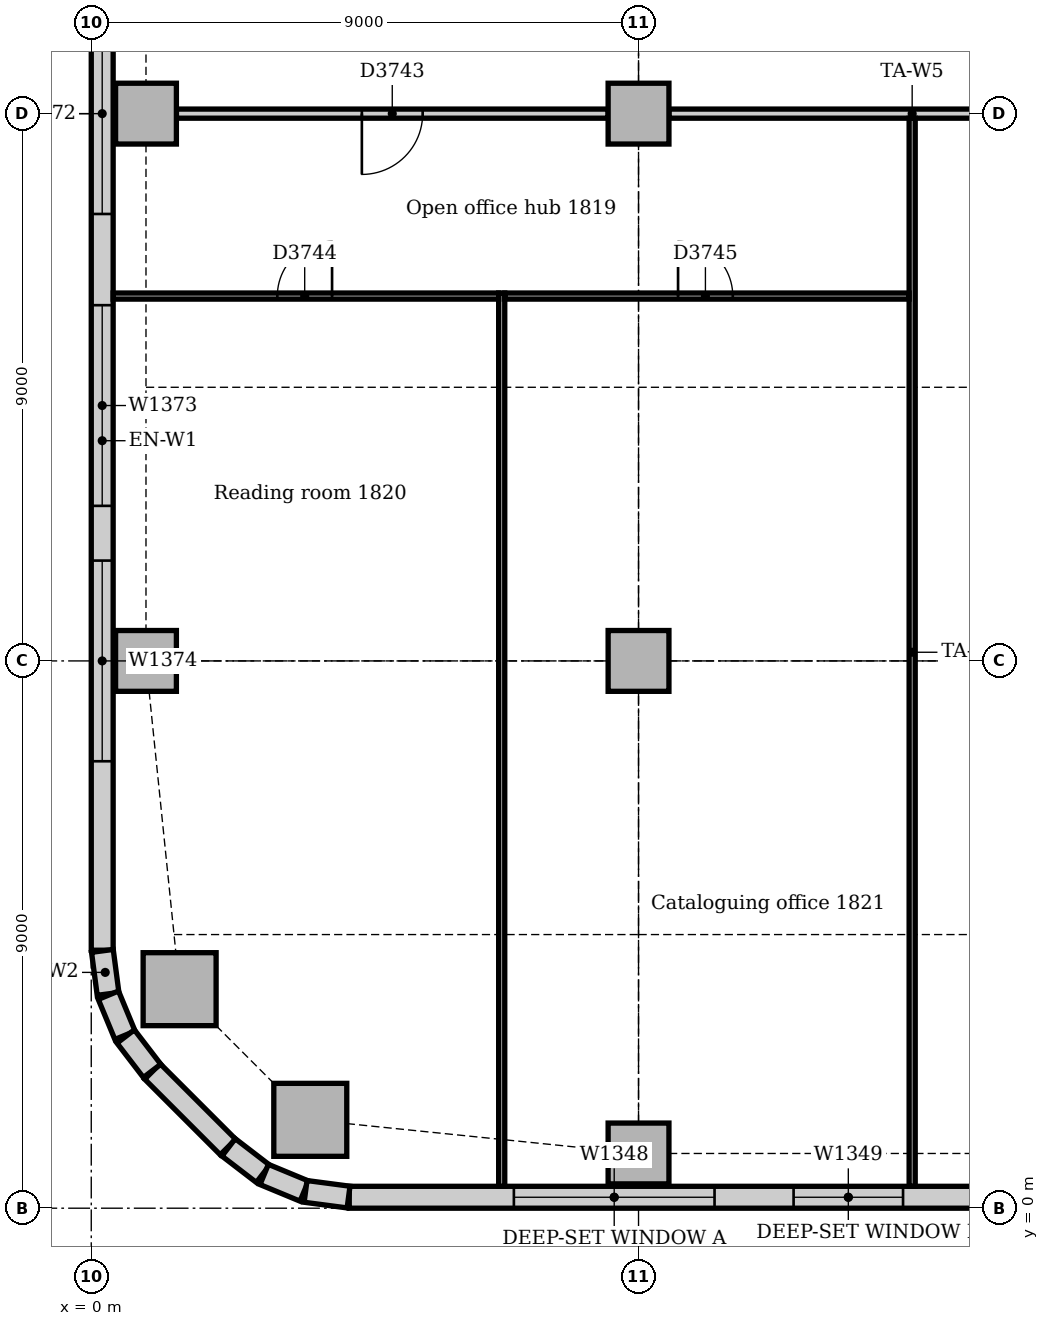
"""IFC4 building model, lengths in metres.
Left out: names, types, materials, properties, quantities, classifications, styles, units other than length and angle.
Written with IfcOpenShell. Run it as: python <this file> out.ifc"""

import sys

from ifc_helpers import new_model, si_unit, direction, frame, frame_2d, origin, origin_2d, place, context, subcontext, project, spatial, rectangle, extrude, element, fill, save


model = new_model("IFC4")
c1 = context("Model", 3, precision=1e-05, world=origin(), true_north=direction((0.0, 1.0)))
c2 = subcontext(c1, "Body", "Model", "MODEL_VIEW")
j1 = project(units=[si_unit("LENGTHUNIT", "METRE"), si_unit("PLANEANGLEUNIT", "RADIAN")], contexts=[c1])
p1 = place(None, origin())
s1 = spatial("IfcSite", under=j1, at=p1, CompositionType="ELEMENT")
p2 = place(p1, origin())
s2 = spatial("IfcBuilding", under=s1, at=p2, CompositionType="ELEMENT")
p3 = place(p2, frame((0.0, 0.0, 79.0)))
s3 = spatial("IfcBuildingStorey", under=s2, at=p3, CompositionType="ELEMENT", Elevation=79.0)
for number, where, z_axis, x_axis in (
    (1, (3.602, 1.453, 0.0), (0.0, 0.0, 1.0), (1.0, 0.0, 0.0)),
    (2, (1.453, 3.602, 0.0), (0.0, 0.0, 1.0), (1.0, 0.0, 0.0)),
):
    element("IfcColumn", number, at=place(p3, frame(where, z_axis=z_axis, x_axis=x_axis)), inside=s3, PredefinedType="COLUMN", context=c2, shape_type="SweptSolid", body=[
        extrude(rectangle(XDim=1.2, YDim=1.2, at=origin_2d()), origin(), (0.0, 0.0, 1.0), 3.85),
    ])
for number, where, z_axis, x_axis in (
    (3, (9.0, 0.9, 0.0), (0.0, 0.0, 1.0), (1.0, 0.0, 0.0)),
    (4, (0.9, 9.0, 0.0), (0.0, 0.0, 1.0), (1.0, 0.0, 0.0)),
    (5, (0.9, 18.0, 0.0), (0.0, 0.0, 1.0), (1.0, 0.0, 0.0)),
    (6, (9.0, 9.0, 0.0), (0.0, 0.0, 1.0), (1.0, 0.0, 0.0)),
    (7, (9.0, 18.0, 0.0), (0.0, 0.0, 1.0), (1.0, 0.0, 0.0)),
):
    element("IfcColumn", number, at=place(p3, frame(where, z_axis=z_axis, x_axis=x_axis)), inside=s3, PredefinedType="COLUMN", context=c2, shape_type="SweptSolid", body=[
        extrude(rectangle(XDim=1.0, YDim=1.0, at=origin_2d()), origin(), (0.0, 0.0, 1.0), 3.85),
    ])
p4 = place(p3, frame((4.243, 0.18, 0.0), z_axis=(0.0, 0.0, 1.0), x_axis=(1.0, 0.0, 0.0)))
e8 = element("IfcWall", 8, at=p4, inside=s3, PredefinedType="STANDARD", context=c2, shape_type="SweptSolid", body=[
    extrude(rectangle(XDim=44.015, YDim=0.36, at=frame_2d((22.007, 0.0))), origin(), (0.0, 0.0, 1.0), 3.85),
])
p5 = place(p4, frame((2.707, 0.0, 0.9)))
e9 = element("IfcOpeningElement", 9, at=p5, cuts=e8, PredefinedType="OPENING", context=c2, shape_type="SweptSolid", body=[
    extrude(rectangle(XDim=3.3, YDim=1.6, at=frame_2d((1.65, 0.8))), frame((0.0, 0.19, 0.0), z_axis=(0.0, -1.0, 0.0), x_axis=(1.0, 0.0, 0.0)), (0.0, 0.0, 1.0), 0.38),
])
p6 = place(p4, frame((7.307, 0.0, 0.9)))
e10 = element("IfcOpeningElement", 10, at=p6, cuts=e8, PredefinedType="OPENING", context=c2, shape_type="SweptSolid", body=[
    extrude(rectangle(XDim=1.8, YDim=1.6, at=frame_2d((0.9, 0.8))), frame((0.0, 0.19, 0.0), z_axis=(0.0, -1.0, 0.0), x_axis=(1.0, 0.0, 0.0)), (0.0, 0.0, 1.0), 0.38),
])
p7 = place(p4, frame((11.357, 0.0, 0.9)))
e11 = element("IfcOpeningElement", 11, at=p7, cuts=e8, PredefinedType="OPENING", context=c2, shape_type="SweptSolid", body=[
    extrude(rectangle(XDim=3.3, YDim=1.6, at=frame_2d((1.65, 0.8))), frame((0.0, 0.19, 0.0), z_axis=(0.0, -1.0, 0.0), x_axis=(1.0, 0.0, 0.0)), (0.0, 0.0, 1.0), 0.38),
])
p8 = place(p4, frame((15.857, 0.0, 0.9)))
e12 = element("IfcOpeningElement", 12, at=p8, cuts=e8, PredefinedType="OPENING", context=c2, shape_type="SweptSolid", body=[
    extrude(rectangle(XDim=3.3, YDim=1.6, at=frame_2d((1.65, 0.8))), frame((0.0, 0.19, 0.0), z_axis=(0.0, -1.0, 0.0), x_axis=(1.0, 0.0, 0.0)), (0.0, 0.0, 1.0), 0.38),
])
p9 = place(p4, frame((20.357, 0.0, 0.9)))
e13 = element("IfcOpeningElement", 13, at=p9, cuts=e8, PredefinedType="OPENING", context=c2, shape_type="SweptSolid", body=[
    extrude(rectangle(XDim=3.3, YDim=1.6, at=frame_2d((1.65, 0.8))), frame((0.0, 0.19, 0.0), z_axis=(0.0, -1.0, 0.0), x_axis=(1.0, 0.0, 0.0)), (0.0, 0.0, 1.0), 0.38),
])
p10 = place(p4, frame((24.857, 0.0, 0.9)))
e14 = element("IfcOpeningElement", 14, at=p10, cuts=e8, PredefinedType="OPENING", context=c2, shape_type="SweptSolid", body=[
    extrude(rectangle(XDim=3.3, YDim=1.6, at=frame_2d((1.65, 0.8))), frame((0.0, 0.19, 0.0), z_axis=(0.0, -1.0, 0.0), x_axis=(1.0, 0.0, 0.0)), (0.0, 0.0, 1.0), 0.38),
])
p11 = place(p4, frame((29.357, 0.0, 0.9)))
e15 = element("IfcOpeningElement", 15, at=p11, cuts=e8, PredefinedType="OPENING", context=c2, shape_type="SweptSolid", body=[
    extrude(rectangle(XDim=3.3, YDim=1.6, at=frame_2d((1.65, 0.8))), frame((0.0, 0.19, 0.0), z_axis=(0.0, -1.0, 0.0), x_axis=(1.0, 0.0, 0.0)), (0.0, 0.0, 1.0), 0.38),
])
p12 = place(p4, frame((33.857, 0.0, 0.9)))
e16 = element("IfcOpeningElement", 16, at=p12, cuts=e8, PredefinedType="OPENING", context=c2, shape_type="SweptSolid", body=[
    extrude(rectangle(XDim=3.3, YDim=1.6, at=frame_2d((1.65, 0.8))), frame((0.0, 0.19, 0.0), z_axis=(0.0, -1.0, 0.0), x_axis=(1.0, 0.0, 0.0)), (0.0, 0.0, 1.0), 0.38),
])
p13 = place(p4, frame((38.357, 0.0, 0.9)))
e17 = element("IfcOpeningElement", 17, at=p13, cuts=e8, PredefinedType="OPENING", context=c2, shape_type="SweptSolid", body=[
    extrude(rectangle(XDim=3.3, YDim=1.6, at=frame_2d((1.65, 0.8))), frame((0.0, 0.19, 0.0), z_axis=(0.0, -1.0, 0.0), x_axis=(1.0, 0.0, 0.0)), (0.0, 0.0, 1.0), 0.38),
])
p14 = place(p3, frame((0.18, 21.0, 0.0), z_axis=(0.0, 0.0, 1.0), x_axis=(0.0, -1.0, 0.0)))
e18 = element("IfcWall", 18, at=p14, inside=s3, PredefinedType="STANDARD", context=c2, shape_type="SweptSolid", body=[
    extrude(rectangle(XDim=16.757, YDim=0.36, at=frame_2d((8.379, 0.0))), origin(), (0.0, 0.0, 1.0), 3.85),
])
p15 = place(p14, frame((1.35, 0.0, 0.9)))
e19 = element("IfcOpeningElement", 19, at=p15, cuts=e18, PredefinedType="OPENING", context=c2, shape_type="SweptSolid", body=[
    extrude(rectangle(XDim=3.3, YDim=1.6, at=frame_2d((1.65, 0.8))), frame((0.0, 0.19, 0.0), z_axis=(0.0, -1.0, 0.0), x_axis=(1.0, 0.0, 0.0)), (0.0, 0.0, 1.0), 0.38),
])
p16 = place(p14, frame((6.15, 0.0, 0.9)))
e20 = element("IfcOpeningElement", 20, at=p16, cuts=e18, PredefinedType="OPENING", context=c2, shape_type="SweptSolid", body=[
    extrude(rectangle(XDim=3.3, YDim=1.6, at=frame_2d((1.65, 0.8))), frame((0.0, 0.19, 0.0), z_axis=(0.0, -1.0, 0.0), x_axis=(1.0, 0.0, 0.0)), (0.0, 0.0, 1.0), 0.38),
])
p17 = place(p14, frame((10.35, 0.0, 0.9)))
e21 = element("IfcOpeningElement", 21, at=p17, cuts=e18, PredefinedType="OPENING", context=c2, shape_type="SweptSolid", body=[
    extrude(rectangle(XDim=3.3, YDim=1.6, at=frame_2d((1.65, 0.8))), frame((0.0, 0.19, 0.0), z_axis=(0.0, -1.0, 0.0), x_axis=(1.0, 0.0, 0.0)), (0.0, 0.0, 1.0), 0.38),
])
p18 = place(p3, frame((1.006, 2.249, 0.0), z_axis=(0.0, 0.0, 1.0), x_axis=(0.707106781187, -0.707106781187, 0.0)))
e22 = element("IfcWall", 22, at=p18, inside=s3, PredefinedType="STANDARD", context=c2, shape_type="SweptSolid", body=[
    extrude(rectangle(XDim=1.757, YDim=0.36, at=frame_2d((0.879, 0.0))), origin(), (0.0, 0.0, 1.0), 3.85),
])
for number, where, z_axis, x_axis in (
    (23, (0.183, 4.231, 0.0), (0.0, 0.0, 1.0), (0.131, -0.991, 0.0)),
    (24, (0.282, 3.503, 0.0), (0.0, 0.0, 1.0), (0.383, -0.924, 0.0)),
):
    element("IfcWall", number, at=place(p3, frame(where, z_axis=z_axis, x_axis=x_axis)), inside=s3, PredefinedType="STANDARD", context=c2, shape_type="SweptSolid", body=[
        extrude(rectangle(XDim=0.713, YDim=0.36, at=frame_2d((0.356, 0.0))), origin(), (0.0, 0.0, 1.0), 3.85),
    ])
for number, where, z_axis, x_axis in (
    (25, (0.566, 2.825, 0.0), (0.0, 0.0, 1.0), (0.609, -0.793, 0.0)),
    (26, (2.259, 1.0, 0.0), (0.0, 0.0, 1.0), (0.793, -0.609, 0.0)),
):
    element("IfcWall", number, at=place(p3, frame(where, z_axis=z_axis, x_axis=x_axis)), inside=s3, PredefinedType="STANDARD", context=c2, shape_type="SweptSolid", body=[
        extrude(rectangle(XDim=0.713, YDim=0.36, at=frame_2d((0.357, 0.0))), origin(), (0.0, 0.0, 1.0), 3.85),
    ])
for number, where, z_axis, x_axis in (
    (27, (2.844, 0.555, 0.0), (0.0, 0.0, 1.0), (0.924, -0.383, 0.0)),
    (28, (3.524, 0.276, 0.0), (0.0, 0.0, 1.0), (0.991, -0.131, 0.0)),
):
    element("IfcWall", number, at=place(p3, frame(where, z_axis=z_axis, x_axis=x_axis)), inside=s3, PredefinedType="STANDARD", context=c2, shape_type="SweptSolid", body=[
        extrude(rectangle(XDim=0.713, YDim=0.36, at=frame_2d((0.356, 0.0))), origin(), (0.0, 0.0, 1.0), 3.85),
    ])
p19 = place(p3, frame((9.5, 18.0, 0.0), z_axis=(0.0, 0.0, 1.0), x_axis=(1.0, 0.0, 0.0)))
e29 = element("IfcWall", 29, at=p19, inside=s3, PredefinedType="PARTITIONING", context=c2, shape_type="SweptSolid", body=[
    extrude(rectangle(XDim=8.0, YDim=0.15, at=frame_2d((4.0, 0.0))), origin(), (0.0, 0.0, 1.0), 3.15),
])
p20 = place(p3, frame((1.4, 18.0, 0.0), z_axis=(0.0, 0.0, 1.0), x_axis=(1.0, 0.0, 0.0)))
e30 = element("IfcWall", 30, at=p20, inside=s3, PredefinedType="PARTITIONING", context=c2, shape_type="SweptSolid", body=[
    extrude(rectangle(XDim=7.1, YDim=0.15, at=frame_2d((3.55, 0.0))), origin(), (0.0, 0.0, 1.0), 3.15),
])
p21 = place(p20, frame((3.05, 0.0, 0.0)))
e31 = element("IfcOpeningElement", 31, at=p21, cuts=e30, PredefinedType="OPENING", context=c2, shape_type="SweptSolid", body=[
    extrude(rectangle(XDim=1.0, YDim=2.1, at=frame_2d((0.5, 1.05))), frame((0.0, 0.085, 0.0), z_axis=(0.0, -1.0, 0.0), x_axis=(1.0, 0.0, 0.0)), (0.0, 0.0, 1.0), 0.17),
])
p22 = place(p3, frame((13.5, 0.36, 0.0), z_axis=(0.0, 0.0, 1.0), x_axis=(0.0, 1.0, 0.0)))
e32 = element("IfcWall", 32, at=p22, inside=s3, PredefinedType="PARTITIONING", context=c2, shape_type="SweptSolid", body=[
    extrude(rectangle(XDim=17.565, YDim=0.1, at=frame_2d((8.783, 0.0))), origin(), (0.0, 0.0, 1.0), 3.85),
])
p23 = place(p3, frame((6.75, 0.36, 0.0), z_axis=(0.0, 0.0, 1.0), x_axis=(0.0, 1.0, 0.0)))
e33 = element("IfcWall", 33, at=p23, inside=s3, PredefinedType="PARTITIONING", context=c2, shape_type="SweptSolid", body=[
    extrude(rectangle(XDim=14.69, YDim=0.1, at=frame_2d((7.345, 0.0))), origin(), (0.0, 0.0, 1.0), 3.85),
])
p24 = place(p3, frame((6.8, 15.0, 0.0), z_axis=(0.0, 0.0, 1.0), x_axis=(1.0, 0.0, 0.0)))
e34 = element("IfcWall", 34, at=p24, inside=s3, PredefinedType="PARTITIONING", context=c2, shape_type="SweptSolid", body=[
    extrude(rectangle(XDim=6.65, YDim=0.1, at=frame_2d((3.325, 0.0))), origin(), (0.0, 0.0, 1.0), 3.85),
])
p25 = place(p24, frame((2.85, 0.0, 0.0)))
e35 = element("IfcOpeningElement", 35, at=p25, cuts=e34, PredefinedType="OPENING", context=c2, shape_type="SweptSolid", body=[
    extrude(rectangle(XDim=0.9, YDim=2.1, at=frame_2d((0.45, 1.05))), frame((0.0, 0.06, 0.0), z_axis=(0.0, -1.0, 0.0), x_axis=(1.0, 0.0, 0.0)), (0.0, 0.0, 1.0), 0.12),
])
p26 = place(p3, frame((0.36, 15.0, 0.0), z_axis=(0.0, 0.0, 1.0), x_axis=(1.0, 0.0, 0.0)))
e36 = element("IfcWall", 36, at=p26, inside=s3, PredefinedType="PARTITIONING", context=c2, shape_type="SweptSolid", body=[
    extrude(rectangle(XDim=6.34, YDim=0.1, at=frame_2d((3.17, 0.0))), origin(), (0.0, 0.0, 1.0), 3.85),
])
p27 = place(p26, frame((2.7, 0.0, 0.0)))
e37 = element("IfcOpeningElement", 37, at=p27, cuts=e36, PredefinedType="OPENING", context=c2, shape_type="SweptSolid", body=[
    extrude(rectangle(XDim=0.9, YDim=2.1, at=frame_2d((0.45, 1.05))), frame((0.0, 0.06, 0.0), z_axis=(0.0, -1.0, 0.0), x_axis=(1.0, 0.0, 0.0)), (0.0, 0.0, 1.0), 0.12),
])
p28 = place(p5, origin())
e38 = element("IfcWindow", 38, at=p28, inside=s3, PartitioningType="SINGLE_PANEL", PredefinedType="WINDOW", context=c2, shape_type="SweptSolid", body=[
    extrude(rectangle(XDim=3.3, YDim=1.6, at=frame_2d((1.65, 0.8))), frame((0.0, 0.13, 0.0), z_axis=(0.0, -1.0, 0.0), x_axis=(1.0, 0.0, 0.0)), (0.0, 0.0, 1.0), 0.06),
])
fill(e9, e38)
p29 = place(p6, origin())
e39 = element("IfcWindow", 39, at=p29, inside=s3, PartitioningType="SINGLE_PANEL", PredefinedType="WINDOW", context=c2, shape_type="SweptSolid", body=[
    extrude(rectangle(XDim=1.8, YDim=1.6, at=frame_2d((0.9, 0.8))), frame((0.0, 0.13, 0.0), z_axis=(0.0, -1.0, 0.0), x_axis=(1.0, 0.0, 0.0)), (0.0, 0.0, 1.0), 0.06),
])
fill(e10, e39)
p30 = place(p15, origin())
e40 = element("IfcWindow", 40, at=p30, inside=s3, PartitioningType="SINGLE_PANEL", PredefinedType="WINDOW", context=c2, shape_type="SweptSolid", body=[
    extrude(rectangle(XDim=3.3, YDim=1.6, at=frame_2d((1.65, 0.8))), frame((0.0, 0.13, 0.0), z_axis=(0.0, -1.0, 0.0), x_axis=(1.0, 0.0, 0.0)), (0.0, 0.0, 1.0), 0.06),
])
fill(e19, e40)
p31 = place(p16, origin())
e41 = element("IfcWindow", 41, at=p31, inside=s3, PartitioningType="SINGLE_PANEL", PredefinedType="WINDOW", context=c2, shape_type="SweptSolid", body=[
    extrude(rectangle(XDim=3.3, YDim=1.6, at=frame_2d((1.65, 0.8))), frame((0.0, 0.13, 0.0), z_axis=(0.0, -1.0, 0.0), x_axis=(1.0, 0.0, 0.0)), (0.0, 0.0, 1.0), 0.06),
])
fill(e20, e41)
p32 = place(p17, origin())
e42 = element("IfcWindow", 42, at=p32, inside=s3, PartitioningType="SINGLE_PANEL", PredefinedType="WINDOW", context=c2, shape_type="SweptSolid", body=[
    extrude(rectangle(XDim=3.3, YDim=1.6, at=frame_2d((1.65, 0.8))), frame((0.0, 0.13, 0.0), z_axis=(0.0, -1.0, 0.0), x_axis=(1.0, 0.0, 0.0)), (0.0, 0.0, 1.0), 0.06),
])
fill(e21, e42)
p33 = place(p21, frame((1.0, 0.0, 0.0), z_axis=(0.0, 0.0, 1.0), x_axis=(-1.0, 0.0, 0.0)))
e43 = element("IfcDoor", 43, at=p33, inside=s3, OperationType="SINGLE_SWING_RIGHT", PredefinedType="DOOR", context=c2, shape_type="SweptSolid", body=[
    extrude(rectangle(XDim=1.0, YDim=2.1, at=frame_2d((0.5, 1.05))), frame((0.0, 0.025, 0.0), z_axis=(0.0, -1.0, 0.0), x_axis=(1.0, 0.0, 0.0)), (0.0, 0.0, 1.0), 0.05),
])
fill(e31, e43)
p34 = place(p27, origin())
e44 = element("IfcDoor", 44, at=p34, inside=s3, OperationType="SINGLE_SWING_RIGHT", PredefinedType="DOOR", context=c2, shape_type="SweptSolid", body=[
    extrude(rectangle(XDim=0.9, YDim=2.1, at=frame_2d((0.45, 1.05))), frame((0.0, 0.025, 0.0), z_axis=(0.0, -1.0, 0.0), x_axis=(1.0, 0.0, 0.0)), (0.0, 0.0, 1.0), 0.05),
])
fill(e37, e44)
p35 = place(p25, origin())
e45 = element("IfcDoor", 45, at=p35, inside=s3, OperationType="SINGLE_SWING_LEFT", PredefinedType="DOOR", context=c2, shape_type="SweptSolid", body=[
    extrude(rectangle(XDim=0.9, YDim=2.1, at=frame_2d((0.45, 1.05))), frame((0.0, 0.025, 0.0), z_axis=(0.0, -1.0, 0.0), x_axis=(1.0, 0.0, 0.0)), (0.0, 0.0, 1.0), 0.05),
])
fill(e35, e45)
save(model, sys.argv[1])
